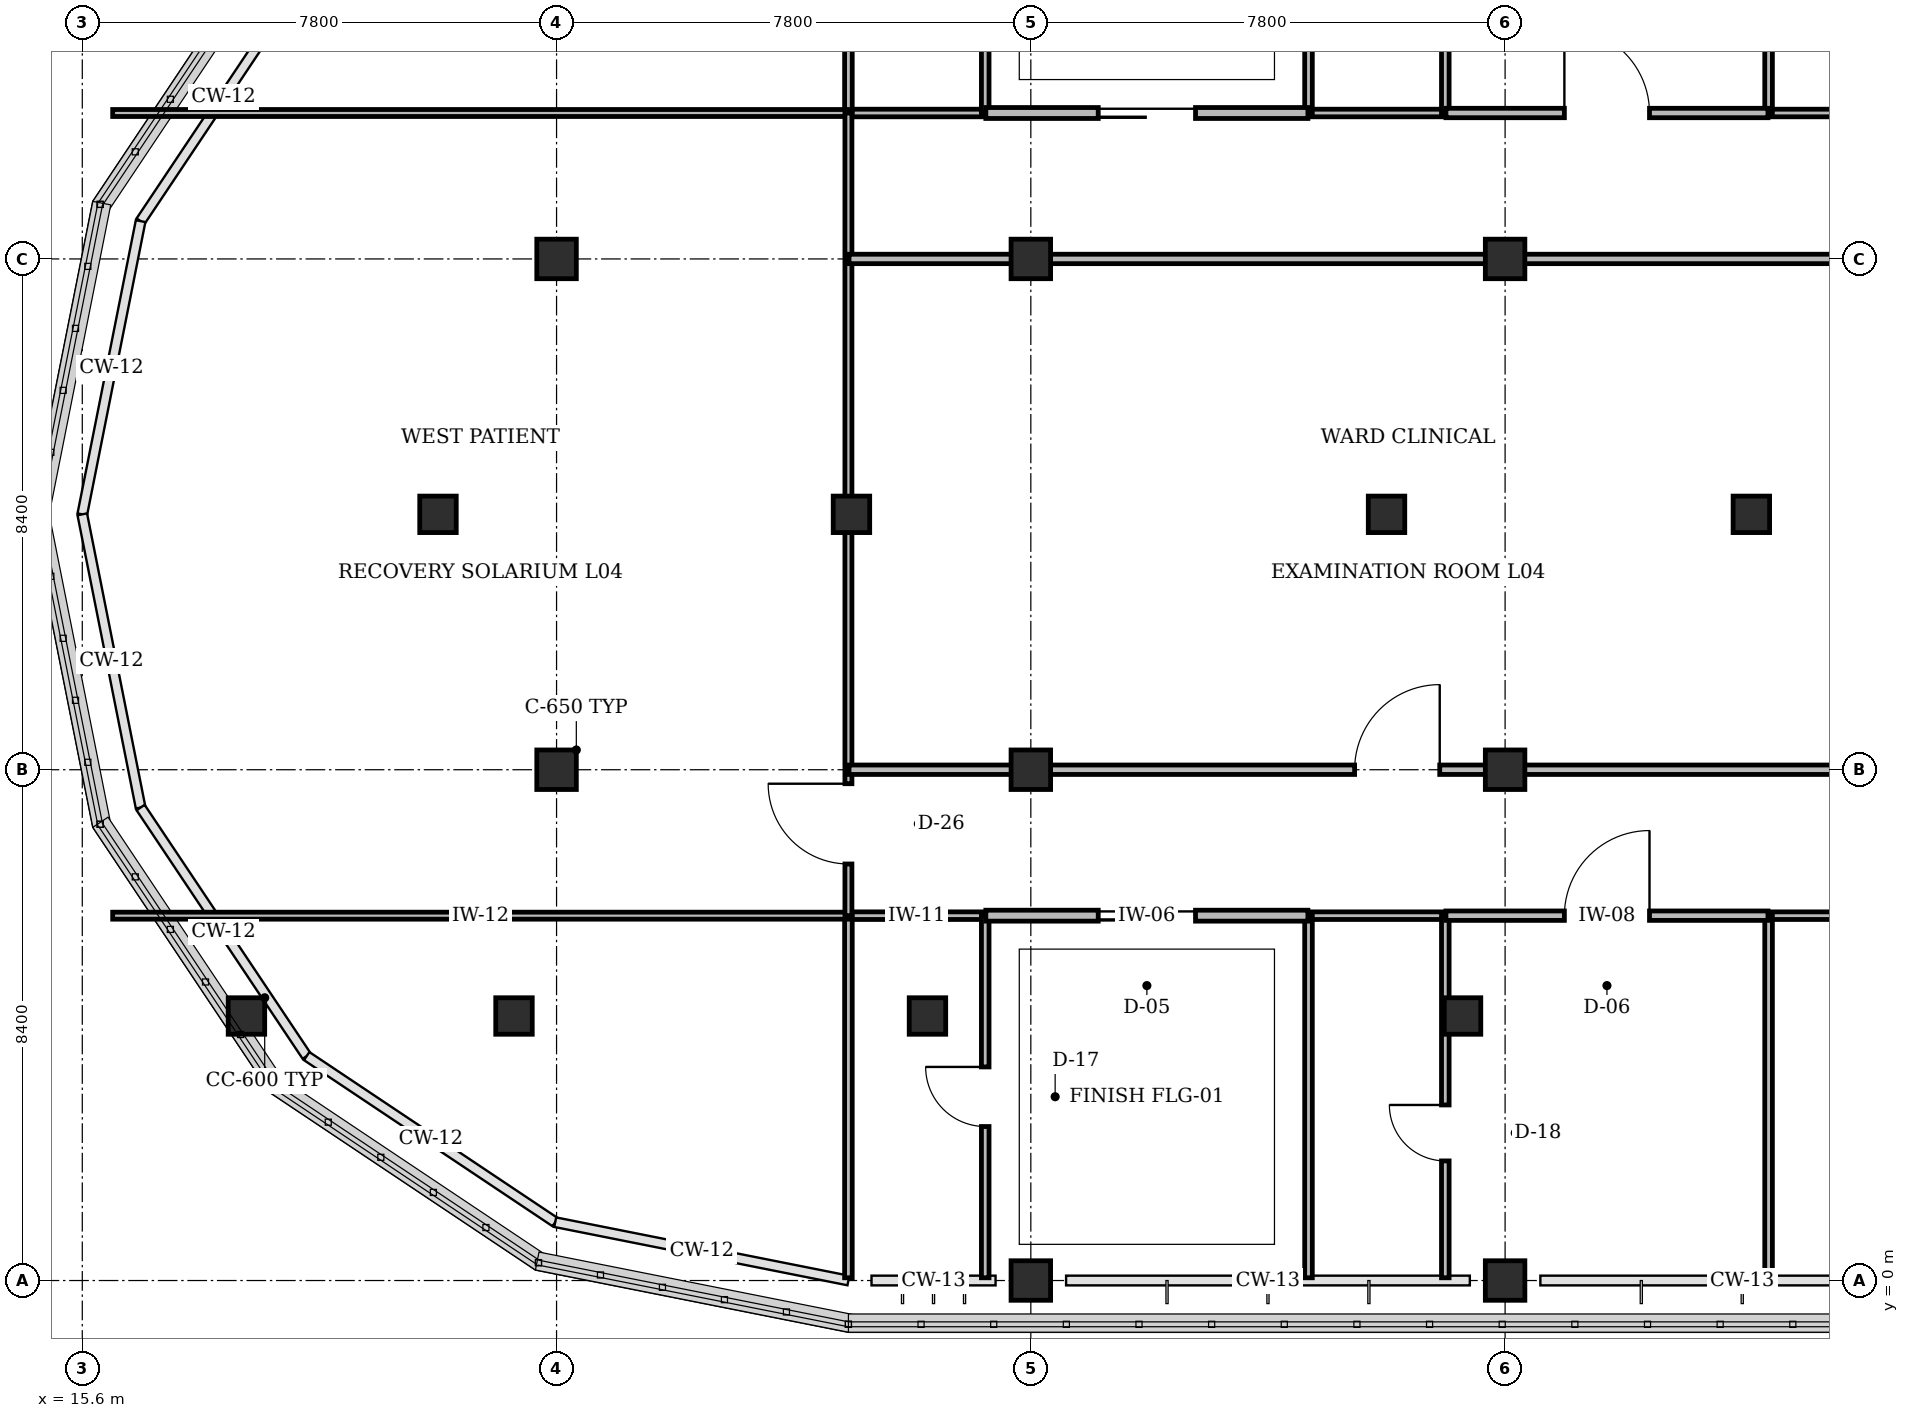
"""IFC4 building model, lengths in metres.
Left out: names, types, materials, properties, quantities, classifications, styles, units other than length and angle.
Written with IfcOpenShell. Run it as: python <this file> out.ifc"""

import sys

from ifc_helpers import new_model, si_unit, direction, frame, frame_2d, origin, origin_2d, place, context, subcontext, project, spatial, rectangle, circle, extrude, element, fill, save


model = new_model("IFC4")
c1 = context("Model", 3, precision=1e-05, world=origin(), true_north=direction((0.0, 1.0)))
c2 = subcontext(c1, "Body", "Model", "MODEL_VIEW")
j1 = project(units=[si_unit("LENGTHUNIT", "METRE"), si_unit("PLANEANGLEUNIT", "RADIAN")], contexts=[c1])
p1 = place(None, origin())
s1 = spatial("IfcSite", under=j1, at=p1, CompositionType="ELEMENT")
p2 = place(p1, origin())
s2 = spatial("IfcBuilding", under=s1, at=p2, CompositionType="ELEMENT")
p3 = place(p2, frame((0.0, 0.0, 18.0)))
s3 = spatial("IfcBuildingStorey", under=s2, at=p3, CompositionType="ELEMENT", Elevation=18.0)
for number, where, z_axis, x_axis in (
    (1, (23.4, 8.4, 0.0), (0.0, 0.0, 1.0), (1.0, 0.0, 0.0)),
    (2, (23.4, 16.8, 0.0), (0.0, 0.0, 1.0), (1.0, 0.0, 0.0)),
    (3, (31.2, 0.0, 0.0), (0.0, 0.0, 1.0), (1.0, 0.0, 0.0)),
    (4, (31.2, 8.4, 0.0), (0.0, 0.0, 1.0), (1.0, 0.0, 0.0)),
    (5, (31.2, 16.8, 0.0), (0.0, 0.0, 1.0), (1.0, 0.0, 0.0)),
    (6, (39.0, 0.0, 0.0), (0.0, 0.0, 1.0), (1.0, 0.0, 0.0)),
    (7, (39.0, 8.4, 0.0), (0.0, 0.0, 1.0), (1.0, 0.0, 0.0)),
    (8, (39.0, 16.8, 0.0), (0.0, 0.0, 1.0), (1.0, 0.0, 0.0)),
):
    element("IfcColumn", number, at=place(p3, frame(where, z_axis=z_axis, x_axis=x_axis)), inside=s3, PredefinedType="COLUMN", context=c2, shape_type="SweptSolid", body=[
        extrude(rectangle(XDim=0.65, YDim=0.65, at=origin_2d()), origin(), (0.0, 0.0, 1.0), 4.2),
    ])
for number, where, z_axis, x_axis in (
    (9, (18.3, 4.35, 0.0), (0.0, 0.0, 1.0), (1.0, 0.0, 0.0)),
    (10, (21.45, 12.6, 0.0), (0.0, 0.0, 1.0), (1.0, 0.0, 0.0)),
    (11, (22.7, 4.35, 0.0), (0.0, 0.0, 1.0), (1.0, 0.0, 0.0)),
    (12, (28.25, 12.6, 0.0), (0.0, 0.0, 1.0), (1.0, 0.0, 0.0)),
    (13, (29.5, 4.35, 0.0), (0.0, 0.0, 1.0), (1.0, 0.0, 0.0)),
    (14, (37.05, 12.6, 0.0), (0.0, 0.0, 1.0), (1.0, 0.0, 0.0)),
    (15, (38.3, 4.35, 0.0), (0.0, 0.0, 1.0), (1.0, 0.0, 0.0)),
    (16, (43.05, 12.6, 0.0), (0.0, 0.0, 1.0), (1.0, 0.0, 0.0)),
):
    element("IfcColumn", number, at=place(p3, frame(where, z_axis=z_axis, x_axis=x_axis)), inside=s3, PredefinedType="PILASTER", context=c2, shape_type="SweptSolid", body=[
        extrude(circle(Radius=0.3, at=origin_2d()), origin(), (0.0, 0.0, 1.0), 4.2),
    ])
p4 = place(p3, frame((28.2, 6.0, 0.0), z_axis=(0.0, 0.0, 1.0), x_axis=(1.0, 0.0, 0.0)))
e17 = element("IfcWall", 17, at=p4, inside=s3, PredefinedType="PARTITIONING", context=c2, shape_type="SweptSolid", body=[
    extrude(rectangle(XDim=2.25, YDim=0.125, at=frame_2d((1.125, 0.0))), origin(), (0.0, 0.0, 1.0), 3.9),
])
p5 = place(p3, frame((28.2, 0.045, 0.0), z_axis=(0.0, 0.0, 1.0), x_axis=(0.0, 1.0, 0.0)))
e18 = element("IfcWall", 18, at=p5, inside=s3, PredefinedType="PARTITIONING", context=c2, shape_type="SweptSolid", body=[
    extrude(rectangle(XDim=5.955, YDim=0.125, at=frame_2d((2.978, 0.0))), origin(), (0.0, 0.0, 1.0), 3.9),
])
p6 = place(p3, frame((30.45, 0.045, 0.0), z_axis=(0.0, 0.0, 1.0), x_axis=(0.0, 1.0, 0.0)))
e19 = element("IfcWall", 19, at=p6, inside=s3, PredefinedType="PARTITIONING", context=c2, shape_type="SweptSolid", body=[
    extrude(rectangle(XDim=5.955, YDim=0.125, at=frame_2d((2.978, 0.0))), origin(), (0.0, 0.0, 1.0), 3.9),
])
p7 = place(p6, frame((2.488, 0.0, 0.0)))
e20 = element("IfcOpeningElement", 20, at=p7, cuts=e19, PredefinedType="OPENING", context=c2, shape_type="SweptSolid", body=[
    extrude(rectangle(XDim=0.98, YDim=2.1, at=frame_2d((0.49, 1.05))), frame((0.0, 0.073, 0.0), z_axis=(0.0, -1.0, 0.0), x_axis=(1.0, 0.0, 0.0)), (0.0, 0.0, 1.0), 0.145),
])
p8 = place(p3, frame((28.2, 19.2, 0.0), z_axis=(0.0, 0.0, 1.0), x_axis=(1.0, 0.0, 0.0)))
e21 = element("IfcWall", 21, at=p8, inside=s3, PredefinedType="PARTITIONING", context=c2, shape_type="SweptSolid", body=[
    extrude(rectangle(XDim=2.25, YDim=0.125, at=frame_2d((1.125, 0.0))), origin(), (0.0, 0.0, 1.0), 3.9),
])
p9 = place(p3, frame((28.2, 19.2, 0.0), z_axis=(0.0, 0.0, 1.0), x_axis=(0.0, 1.0, 0.0)))
e22 = element("IfcWall", 22, at=p9, inside=s3, PredefinedType="PARTITIONING", context=c2, shape_type="SweptSolid", body=[
    extrude(rectangle(XDim=5.955, YDim=0.125, at=frame_2d((2.978, 0.0))), origin(), (0.0, 0.0, 1.0), 3.9),
])
p10 = place(p3, frame((30.45, 19.2, 0.0), z_axis=(0.0, 0.0, 1.0), x_axis=(0.0, 1.0, 0.0)))
e23 = element("IfcWall", 23, at=p10, inside=s3, PredefinedType="PARTITIONING", context=c2, shape_type="SweptSolid", body=[
    extrude(rectangle(XDim=5.955, YDim=0.125, at=frame_2d((2.978, 0.0))), origin(), (0.0, 0.0, 1.0), 3.9),
])
p11 = place(p10, frame((2.488, 0.0, 0.0)))
e24 = element("IfcOpeningElement", 24, at=p11, cuts=e23, PredefinedType="OPENING", context=c2, shape_type="SweptSolid", body=[
    extrude(rectangle(XDim=0.98, YDim=2.1, at=frame_2d((0.49, 1.05))), frame((0.0, 0.073, 0.0), z_axis=(0.0, -1.0, 0.0), x_axis=(1.0, 0.0, 0.0)), (0.0, 0.0, 1.0), 0.145),
])
p12 = place(p3, frame((35.767, 6.0, 0.0), z_axis=(0.0, 0.0, 1.0), x_axis=(1.0, 0.0, 0.0)))
e25 = element("IfcWall", 25, at=p12, inside=s3, PredefinedType="PARTITIONING", context=c2, shape_type="SweptSolid", body=[
    extrude(rectangle(XDim=2.25, YDim=0.125, at=frame_2d((1.125, 0.0))), origin(), (0.0, 0.0, 1.0), 3.9),
])
p13 = place(p3, frame((35.767, 0.045, 0.0), z_axis=(0.0, 0.0, 1.0), x_axis=(0.0, 1.0, 0.0)))
e26 = element("IfcWall", 26, at=p13, inside=s3, PredefinedType="PARTITIONING", context=c2, shape_type="SweptSolid", body=[
    extrude(rectangle(XDim=5.955, YDim=0.125, at=frame_2d((2.978, 0.0))), origin(), (0.0, 0.0, 1.0), 3.9),
])
p14 = place(p3, frame((38.017, 0.045, 0.0), z_axis=(0.0, 0.0, 1.0), x_axis=(0.0, 1.0, 0.0)))
e27 = element("IfcWall", 27, at=p14, inside=s3, PredefinedType="PARTITIONING", context=c2, shape_type="SweptSolid", body=[
    extrude(rectangle(XDim=5.955, YDim=0.125, at=frame_2d((2.978, 0.0))), origin(), (0.0, 0.0, 1.0), 3.9),
])
p15 = place(p14, frame((1.922, 0.0, 0.0)))
e28 = element("IfcOpeningElement", 28, at=p15, cuts=e27, PredefinedType="OPENING", context=c2, shape_type="SweptSolid", body=[
    extrude(rectangle(XDim=0.92, YDim=2.1, at=frame_2d((0.46, 1.05))), frame((0.0, 0.073, 0.0), z_axis=(0.0, -1.0, 0.0), x_axis=(1.0, 0.0, 0.0)), (0.0, 0.0, 1.0), 0.145),
])
p16 = place(p3, frame((35.767, 19.2, 0.0), z_axis=(0.0, 0.0, 1.0), x_axis=(1.0, 0.0, 0.0)))
e29 = element("IfcWall", 29, at=p16, inside=s3, PredefinedType="PARTITIONING", context=c2, shape_type="SweptSolid", body=[
    extrude(rectangle(XDim=2.25, YDim=0.125, at=frame_2d((1.125, 0.0))), origin(), (0.0, 0.0, 1.0), 3.9),
])
p17 = place(p3, frame((35.767, 19.2, 0.0), z_axis=(0.0, 0.0, 1.0), x_axis=(0.0, 1.0, 0.0)))
e30 = element("IfcWall", 30, at=p17, inside=s3, PredefinedType="PARTITIONING", context=c2, shape_type="SweptSolid", body=[
    extrude(rectangle(XDim=5.955, YDim=0.125, at=frame_2d((2.978, 0.0))), origin(), (0.0, 0.0, 1.0), 3.9),
])
p18 = place(p3, frame((38.017, 19.2, 0.0), z_axis=(0.0, 0.0, 1.0), x_axis=(0.0, 1.0, 0.0)))
e31 = element("IfcWall", 31, at=p18, inside=s3, PredefinedType="PARTITIONING", context=c2, shape_type="SweptSolid", body=[
    extrude(rectangle(XDim=5.955, YDim=0.125, at=frame_2d((2.978, 0.0))), origin(), (0.0, 0.0, 1.0), 3.9),
])
p19 = place(p18, frame((3.113, 0.0, 0.0)))
e32 = element("IfcOpeningElement", 32, at=p19, cuts=e31, PredefinedType="OPENING", context=c2, shape_type="SweptSolid", body=[
    extrude(rectangle(XDim=0.92, YDim=2.1, at=frame_2d((0.46, 1.05))), frame((0.0, 0.073, 0.0), z_axis=(0.0, -1.0, 0.0), x_axis=(1.0, 0.0, 0.0)), (0.0, 0.0, 1.0), 0.145),
])
p20 = place(p3, frame((43.333, 6.0, 0.0), z_axis=(0.0, 0.0, 1.0), x_axis=(1.0, 0.0, 0.0)))
e33 = element("IfcWall", 33, at=p20, inside=s3, PredefinedType="PARTITIONING", context=c2, shape_type="SweptSolid", body=[
    extrude(rectangle(XDim=2.25, YDim=0.125, at=frame_2d((1.125, 0.0))), origin(), (0.0, 0.0, 1.0), 3.9),
])
p21 = place(p3, frame((43.333, 0.045, 0.0), z_axis=(0.0, 0.0, 1.0), x_axis=(0.0, 1.0, 0.0)))
e34 = element("IfcWall", 34, at=p21, inside=s3, PredefinedType="PARTITIONING", context=c2, shape_type="SweptSolid", body=[
    extrude(rectangle(XDim=5.955, YDim=0.125, at=frame_2d((2.978, 0.0))), origin(), (0.0, 0.0, 1.0), 3.9),
])
p22 = place(p3, frame((43.333, 19.2, 0.0), z_axis=(0.0, 0.0, 1.0), x_axis=(1.0, 0.0, 0.0)))
e35 = element("IfcWall", 35, at=p22, inside=s3, PredefinedType="PARTITIONING", context=c2, shape_type="SweptSolid", body=[
    extrude(rectangle(XDim=2.25, YDim=0.125, at=frame_2d((1.125, 0.0))), origin(), (0.0, 0.0, 1.0), 3.9),
])
p23 = place(p3, frame((43.333, 19.2, 0.0), z_axis=(0.0, 0.0, 1.0), x_axis=(0.0, 1.0, 0.0)))
e36 = element("IfcWall", 36, at=p23, inside=s3, PredefinedType="PARTITIONING", context=c2, shape_type="SweptSolid", body=[
    extrude(rectangle(XDim=5.955, YDim=0.125, at=frame_2d((2.978, 0.0))), origin(), (0.0, 0.0, 1.0), 3.9),
])
for number, where, z_axis, x_axis in (
    (37, (16.1, 6.0, 0.0), (0.0, 0.0, 1.0), (1.0, 0.0, 0.0)),
    (38, (16.1, 19.2, 0.0), (0.0, 0.0, 1.0), (1.0, 0.0, 0.0)),
):
    element("IfcWall", number, at=place(p3, frame(where, z_axis=z_axis, x_axis=x_axis)), inside=s3, PredefinedType="PARTITIONING", context=c2, shape_type="SweptSolid", body=[
        extrude(rectangle(XDim=12.1, YDim=0.115, at=frame_2d((6.05, 0.0))), origin(), (0.0, 0.0, 1.0), 3.9),
    ])
p24 = place(p3, frame((28.2, 6.0, 0.0), z_axis=(0.0, 0.0, 1.0), x_axis=(0.0, 1.0, 0.0)))
e39 = element("IfcWall", 39, at=p24, inside=s3, PredefinedType="PARTITIONING", context=c2, shape_type="SweptSolid", body=[
    extrude(rectangle(XDim=13.2, YDim=0.115, at=frame_2d((6.6, 0.0))), origin(), (0.0, 0.0, 1.0), 3.9),
])
p25 = place(p24, frame((0.85, 0.0, 0.0)))
e40 = element("IfcOpeningElement", 40, at=p25, cuts=e39, PredefinedType="OPENING", context=c2, shape_type="SweptSolid", body=[
    extrude(rectangle(XDim=1.32, YDim=2.15, at=frame_2d((0.66, 1.075))), frame((0.0, 0.067, 0.0), z_axis=(0.0, -1.0, 0.0), x_axis=(1.0, 0.0, 0.0)), (0.0, 0.0, 1.0), 0.135),
])
p26 = place(p3, frame((30.46, 6.0, 0.0), z_axis=(0.0, 0.0, 1.0), x_axis=(1.0, 0.0, 0.0)))
e41 = element("IfcWall", 41, at=p26, inside=s3, PredefinedType="PARTITIONING", context=c2, shape_type="SweptSolid", body=[
    extrude(rectangle(XDim=5.297, YDim=0.18, at=frame_2d((2.648, 0.0))), origin(), (0.0, 0.0, 1.0), 3.9),
])
p27 = place(p26, frame((1.848, 0.0, 0.0)))
e42 = element("IfcOpeningElement", 42, at=p27, cuts=e41, PredefinedType="OPENING", context=c2, shape_type="SweptSolid", body=[
    extrude(rectangle(XDim=1.6, YDim=2.25, at=frame_2d((0.8, 1.125))), frame((0.0, 0.1, 0.0), z_axis=(0.0, -1.0, 0.0), x_axis=(1.0, 0.0, 0.0)), (0.0, 0.0, 1.0), 0.2),
])
p28 = place(p3, frame((30.46, 19.2, 0.0), z_axis=(0.0, 0.0, 1.0), x_axis=(1.0, 0.0, 0.0)))
e43 = element("IfcWall", 43, at=p28, inside=s3, PredefinedType="PARTITIONING", context=c2, shape_type="SweptSolid", body=[
    extrude(rectangle(XDim=5.297, YDim=0.18, at=frame_2d((2.648, 0.0))), origin(), (0.0, 0.0, 1.0), 3.9),
])
p29 = place(p28, frame((1.848, 0.0, 0.0)))
e44 = element("IfcOpeningElement", 44, at=p29, cuts=e43, PredefinedType="OPENING", context=c2, shape_type="SweptSolid", body=[
    extrude(rectangle(XDim=1.6, YDim=2.25, at=frame_2d((0.8, 1.125))), frame((0.0, 0.1, 0.0), z_axis=(0.0, -1.0, 0.0), x_axis=(1.0, 0.0, 0.0)), (0.0, 0.0, 1.0), 0.2),
])
p30 = place(p3, frame((38.027, 6.0, 0.0), z_axis=(0.0, 0.0, 1.0), x_axis=(1.0, 0.0, 0.0)))
e45 = element("IfcWall", 45, at=p30, inside=s3, PredefinedType="PARTITIONING", context=c2, shape_type="SweptSolid", body=[
    extrude(rectangle(XDim=5.296, YDim=0.155, at=frame_2d((2.648, 0.0))), origin(), (0.0, 0.0, 1.0), 3.9),
])
p31 = place(p30, frame((1.948, 0.0, 0.0)))
e46 = element("IfcOpeningElement", 46, at=p31, cuts=e45, PredefinedType="OPENING", context=c2, shape_type="SweptSolid", body=[
    extrude(rectangle(XDim=1.4, YDim=2.2, at=frame_2d((0.7, 1.1))), frame((0.0, 0.087, 0.0), z_axis=(0.0, -1.0, 0.0), x_axis=(1.0, 0.0, 0.0)), (0.0, 0.0, 1.0), 0.175),
])
p32 = place(p3, frame((38.027, 19.2, 0.0), z_axis=(0.0, 0.0, 1.0), x_axis=(1.0, 0.0, 0.0)))
e47 = element("IfcWall", 47, at=p32, inside=s3, PredefinedType="PARTITIONING", context=c2, shape_type="SweptSolid", body=[
    extrude(rectangle(XDim=5.296, YDim=0.155, at=frame_2d((2.648, 0.0))), origin(), (0.0, 0.0, 1.0), 3.9),
])
p33 = place(p32, frame((1.948, 0.0, 0.0)))
e48 = element("IfcOpeningElement", 48, at=p33, cuts=e47, PredefinedType="OPENING", context=c2, shape_type="SweptSolid", body=[
    extrude(rectangle(XDim=1.4, YDim=2.2, at=frame_2d((0.7, 1.1))), frame((0.0, 0.087, 0.0), z_axis=(0.0, -1.0, 0.0), x_axis=(1.0, 0.0, 0.0)), (0.0, 0.0, 1.0), 0.175),
])
p34 = place(p3, frame((28.21, 8.4, 0.0), z_axis=(0.0, 0.0, 1.0), x_axis=(1.0, 0.0, 0.0)))
e49 = element("IfcWall", 49, at=p34, inside=s3, PredefinedType="PARTITIONING", context=c2, shape_type="SweptSolid", body=[
    extrude(rectangle(XDim=18.03, YDim=0.155, at=frame_2d((9.015, 0.0))), origin(), (0.0, 0.0, 1.0), 3.22),
])
p35 = place(p34, frame((8.315, 0.0, 0.0)))
e50 = element("IfcOpeningElement", 50, at=p35, cuts=e49, PredefinedType="OPENING", context=c2, shape_type="SweptSolid", body=[
    extrude(rectangle(XDim=1.4, YDim=2.2, at=frame_2d((0.7, 1.1))), frame((0.0, 0.087, 0.0), z_axis=(0.0, -1.0, 0.0), x_axis=(1.0, 0.0, 0.0)), (0.0, 0.0, 1.0), 0.175),
])
p36 = place(p3, frame((28.21, 16.8, 0.0), z_axis=(0.0, 0.0, 1.0), x_axis=(1.0, 0.0, 0.0)))
e51 = element("IfcWall", 51, at=p36, inside=s3, PredefinedType="PARTITIONING", context=c2, shape_type="SweptSolid", body=[
    extrude(rectangle(XDim=18.03, YDim=0.155, at=frame_2d((9.015, 0.0))), origin(), (0.0, 0.0, 1.0), 3.22),
])
p37 = place(p7, origin())
e52 = element("IfcDoor", 52, at=p37, inside=s3, OperationType="SINGLE_SWING_RIGHT", PredefinedType="DOOR", context=c2, shape_type="SweptSolid", body=[
    extrude(rectangle(XDim=0.98, YDim=2.1, at=frame_2d((0.49, 1.05))), frame((0.0, 0.025, 0.0), z_axis=(0.0, -1.0, 0.0), x_axis=(1.0, 0.0, 0.0)), (0.0, 0.0, 1.0), 0.05),
])
fill(e20, e52)
p38 = place(p15, origin())
e53 = element("IfcDoor", 53, at=p38, inside=s3, OperationType="SINGLE_SWING_RIGHT", PredefinedType="DOOR", context=c2, shape_type="SweptSolid", body=[
    extrude(rectangle(XDim=0.92, YDim=2.1, at=frame_2d((0.46, 1.05))), frame((0.0, 0.025, 0.0), z_axis=(0.0, -1.0, 0.0), x_axis=(1.0, 0.0, 0.0)), (0.0, 0.0, 1.0), 0.05),
])
fill(e28, e53)
p39 = place(p25, origin())
e54 = element("IfcDoor", 54, at=p39, inside=s3, OperationType="SINGLE_SWING_RIGHT", PredefinedType="DOOR", context=c2, shape_type="SweptSolid", body=[
    extrude(rectangle(XDim=1.32, YDim=2.15, at=frame_2d((0.66, 1.075))), frame((0.0, 0.025, 0.0), z_axis=(0.0, -1.0, 0.0), x_axis=(1.0, 0.0, 0.0)), (0.0, 0.0, 1.0), 0.05),
])
fill(e40, e54)
p40 = place(p27, origin())
e55 = element("IfcDoor", 55, at=p40, inside=s3, OperationType="SLIDING_TO_RIGHT", PredefinedType="DOOR", context=c2, shape_type="SweptSolid", body=[
    extrude(rectangle(XDim=1.6, YDim=2.25, at=frame_2d((0.8, 1.125))), frame((0.0, 0.025, 0.0), z_axis=(0.0, -1.0, 0.0), x_axis=(1.0, 0.0, 0.0)), (0.0, 0.0, 1.0), 0.05),
])
fill(e42, e55)
p41 = place(p29, origin())
e56 = element("IfcDoor", 56, at=p41, inside=s3, OperationType="SLIDING_TO_RIGHT", PredefinedType="DOOR", context=c2, shape_type="SweptSolid", body=[
    extrude(rectangle(XDim=1.6, YDim=2.25, at=frame_2d((0.8, 1.125))), frame((0.0, 0.025, 0.0), z_axis=(0.0, -1.0, 0.0), x_axis=(1.0, 0.0, 0.0)), (0.0, 0.0, 1.0), 0.05),
])
fill(e44, e56)
p42 = place(p31, origin())
e57 = element("IfcDoor", 57, at=p42, inside=s3, OperationType="SINGLE_SWING_RIGHT", PredefinedType="DOOR", context=c2, shape_type="SweptSolid", body=[
    extrude(rectangle(XDim=1.4, YDim=2.2, at=frame_2d((0.7, 1.1))), frame((0.0, 0.025, 0.0), z_axis=(0.0, -1.0, 0.0), x_axis=(1.0, 0.0, 0.0)), (0.0, 0.0, 1.0), 0.05),
])
fill(e46, e57)
p43 = place(p33, origin())
e58 = element("IfcDoor", 58, at=p43, inside=s3, OperationType="SINGLE_SWING_LEFT", PredefinedType="DOOR", context=c2, shape_type="SweptSolid", body=[
    extrude(rectangle(XDim=1.4, YDim=2.2, at=frame_2d((0.7, 1.1))), frame((0.0, 0.025, 0.0), z_axis=(0.0, -1.0, 0.0), x_axis=(1.0, 0.0, 0.0)), (0.0, 0.0, 1.0), 0.05),
])
fill(e48, e58)
p44 = place(p35, origin())
e59 = element("IfcDoor", 59, at=p44, inside=s3, OperationType="SINGLE_SWING_RIGHT", PredefinedType="DOOR", context=c2, shape_type="SweptSolid", body=[
    extrude(rectangle(XDim=1.4, YDim=2.2, at=frame_2d((0.7, 1.1))), frame((0.0, 0.025, 0.0), z_axis=(0.0, -1.0, 0.0), x_axis=(1.0, 0.0, 0.0)), (0.0, 0.0, 1.0), 0.05),
])
fill(e50, e59)
save(model, sys.argv[1])
